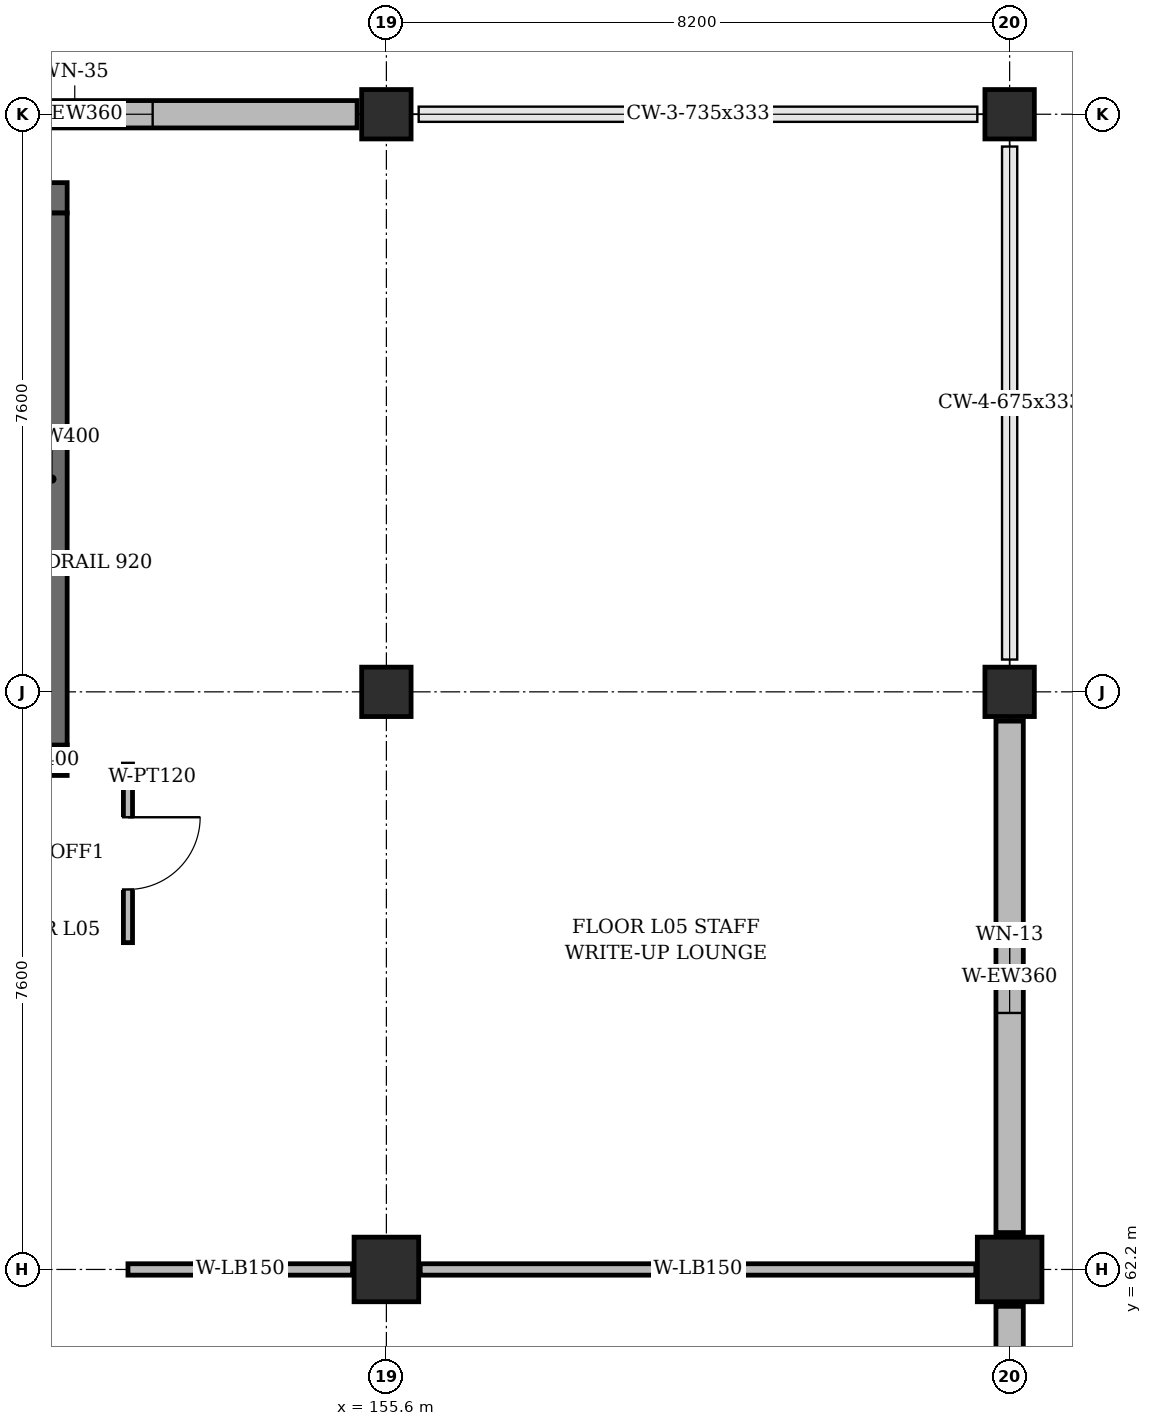
"""IFC4 building model, lengths in metres.
Left out: names, types, materials, properties, quantities, classifications, styles, units other than length and angle.
Written with IfcOpenShell. Run it as: python <this file> out.ifc"""

import sys

from ifc_helpers import new_model, si_unit, direction, frame, frame_2d, origin, origin_2d, place, context, subcontext, project, spatial, rectangle, extrude, element, fill, save


model = new_model("IFC4")
c1 = context("Model", 3, precision=1e-05, world=origin(), true_north=direction((0.0, 1.0)))
c2 = subcontext(c1, "Body", "Model", "MODEL_VIEW")
j1 = project(units=[si_unit("LENGTHUNIT", "METRE"), si_unit("PLANEANGLEUNIT", "RADIAN")], contexts=[c1])
p1 = place(None, origin())
s1 = spatial("IfcSite", under=j1, at=p1, CompositionType="ELEMENT")
p2 = place(p1, origin())
s2 = spatial("IfcBuilding", under=s1, at=p2, CompositionType="ELEMENT")
p3 = place(p2, frame((0.0, 0.0, 24.0)))
s3 = spatial("IfcBuildingStorey", under=s2, at=p3, CompositionType="ELEMENT", Elevation=24.0)
p4 = place(p3, frame((155.6, 62.2, 0.0), z_axis=(0.0, 0.0, 1.0), x_axis=(1.0, 0.0, 0.0)))
e1 = element("IfcColumn", 1, at=p4, inside=s3, PredefinedType="COLUMN", context=c2, shape_type="SweptSolid", body=[
    extrude(rectangle(XDim=0.85, YDim=0.85, at=origin_2d()), origin(), (0.0, 0.0, 1.0), 3.93),
])
for number, where, z_axis, x_axis in (
    (2, (155.6, 69.8, 0.0), (0.0, 0.0, 1.0), (1.0, 0.0, 0.0)),
    (3, (155.6, 77.4, 0.0), (0.0, 0.0, 1.0), (1.0, 0.0, 0.0)),
):
    element("IfcColumn", number, at=place(p3, frame(where, z_axis=z_axis, x_axis=x_axis)), inside=s3, PredefinedType="COLUMN", context=c2, shape_type="SweptSolid", body=[
        extrude(rectangle(XDim=0.65, YDim=0.65, at=origin_2d()), origin(), (0.0, 0.0, 1.0), 3.93),
    ])
p5 = place(p3, frame((163.8, 62.2, 0.0), z_axis=(0.0, 0.0, 1.0), x_axis=(1.0, 0.0, 0.0)))
e4 = element("IfcColumn", 4, at=p5, inside=s3, PredefinedType="COLUMN", context=c2, shape_type="SweptSolid", body=[
    extrude(rectangle(XDim=0.85, YDim=0.85, at=origin_2d()), origin(), (0.0, 0.0, 1.0), 3.93),
])
for number, where, z_axis, x_axis in (
    (5, (163.8, 69.8, 0.0), (0.0, 0.0, 1.0), (1.0, 0.0, 0.0)),
    (6, (163.8, 77.4, 0.0), (0.0, 0.0, 1.0), (1.0, 0.0, 0.0)),
):
    element("IfcColumn", number, at=place(p3, frame(where, z_axis=z_axis, x_axis=x_axis)), inside=s3, PredefinedType="COLUMN", context=c2, shape_type="SweptSolid", body=[
        extrude(rectangle(XDim=0.65, YDim=0.65, at=origin_2d()), origin(), (0.0, 0.0, 1.0), 3.93),
    ])
p6 = place(p3, frame((163.8, 55.085, 0.0), z_axis=(0.0, 0.0, 1.0), x_axis=(0.0, 1.0, 0.0)))
e7 = element("IfcWall", 7, at=p6, inside=s3, PredefinedType="SOLIDWALL", context=c2, shape_type="SweptSolid", body=[
    extrude(rectangle(XDim=6.63, YDim=0.36, at=frame_2d((3.315, 0.0))), origin(), (0.0, 0.0, 1.0), 3.315),
])
p7 = place(p6, frame((2.565, 0.0, 0.95)))
e8 = element("IfcOpeningElement", 8, at=p7, cuts=e7, PredefinedType="OPENING", context=c2, shape_type="SweptSolid", body=[
    extrude(rectangle(XDim=1.5, YDim=2.1, at=frame_2d((0.75, 1.05))), frame((0.0, 0.192, 0.0), z_axis=(0.0, -1.0, 0.0), x_axis=(1.0, 0.0, 0.0)), (0.0, 0.0, 1.0), 0.384),
])
p8 = place(p3, frame((163.8, 62.685, 0.0), z_axis=(0.0, 0.0, 1.0), x_axis=(0.0, 1.0, 0.0)))
e9 = element("IfcWall", 9, at=p8, inside=s3, PredefinedType="SOLIDWALL", context=c2, shape_type="SweptSolid", body=[
    extrude(rectangle(XDim=6.73, YDim=0.36, at=frame_2d((3.365, 0.0))), origin(), (0.0, 0.0, 1.0), 3.315),
])
p9 = place(p8, frame((2.89, 0.0, 0.95)))
e10 = element("IfcOpeningElement", 10, at=p9, cuts=e9, PredefinedType="OPENING", context=c2, shape_type="SweptSolid", body=[
    extrude(rectangle(XDim=0.95, YDim=1.25, at=frame_2d((0.475, 0.625))), frame((0.0, 0.192, 0.0), z_axis=(0.0, -1.0, 0.0), x_axis=(1.0, 0.0, 0.0)), (0.0, 0.0, 1.0), 0.384),
])
p10 = place(p3, frame((155.215, 77.4, 0.0), z_axis=(0.0, 0.0, 1.0), x_axis=(-1.0, 0.0, 0.0)))
e11 = element("IfcWall", 11, at=p10, inside=s3, PredefinedType="SOLIDWALL", context=c2, shape_type="SweptSolid", body=[
    extrude(rectangle(XDim=7.43, YDim=0.36, at=frame_2d((3.715, 0.0))), origin(), (0.0, 0.0, 1.0), 3.315),
])
p11 = place(p10, frame((2.69, 0.0, 0.95)))
e12 = element("IfcOpeningElement", 12, at=p11, cuts=e11, PredefinedType="OPENING", context=c2, shape_type="SweptSolid", body=[
    extrude(rectangle(XDim=2.05, YDim=1.75, at=frame_2d((1.025, 0.875))), frame((0.0, 0.192, 0.0), z_axis=(0.0, -1.0, 0.0), x_axis=(1.0, 0.0, 0.0)), (0.0, 0.0, 1.0), 0.384),
])
p12 = place(p3, frame((147.6, 68.9, 0.0), z_axis=(0.0, 0.0, 1.0), x_axis=(1.0, 0.0, 0.0)))
e13 = element("IfcWall", 13, at=p12, inside=s3, PredefinedType="SHEAR", context=c2, shape_type="SweptSolid", body=[
    extrude(rectangle(XDim=3.8, YDim=0.4, at=frame_2d((1.9, 0.0))), origin(), (0.0, 0.0, 1.0), 3.93),
])
p13 = place(p12, frame((1.3, 0.0, 0.0)))
e14 = element("IfcOpeningElement", 14, at=p13, cuts=e13, PredefinedType="OPENING", context=c2, shape_type="SweptSolid", body=[
    extrude(rectangle(XDim=1.2, YDim=2.2, at=frame_2d((0.6, 1.1))), frame((0.0, 0.212, 0.0), z_axis=(0.0, -1.0, 0.0), x_axis=(1.0, 0.0, 0.0)), (0.0, 0.0, 1.0), 0.424),
])
p14 = place(p3, frame((147.6, 76.3, 0.0), z_axis=(0.0, 0.0, 1.0), x_axis=(1.0, 0.0, 0.0)))
e15 = element("IfcWall", 15, at=p14, inside=s3, PredefinedType="SHEAR", context=c2, shape_type="SweptSolid", body=[
    extrude(rectangle(XDim=3.8, YDim=0.4, at=frame_2d((1.9, 0.0))), origin(), (0.0, 0.0, 1.0), 3.93),
])
p15 = place(p3, frame((151.2, 69.1, 0.0), z_axis=(0.0, 0.0, 1.0), x_axis=(0.0, 1.0, 0.0)))
e16 = element("IfcWall", 16, at=p15, inside=s3, PredefinedType="SHEAR", context=c2, shape_type="SweptSolid", body=[
    extrude(rectangle(XDim=7.0, YDim=0.4, at=frame_2d((3.5, 0.0))), origin(), (0.0, 0.0, 1.0), 3.93),
])
p16 = place(p3, frame((152.2, 68.85, 0.0), z_axis=(0.0, 0.0, 1.0), x_axis=(0.0, -1.0, 0.0)))
e17 = element("IfcWall", 17, at=p16, inside=s3, PredefinedType="PARTITIONING", context=c2, shape_type="SweptSolid", body=[
    extrude(rectangle(XDim=2.35, YDim=0.12, at=frame_2d((1.175, 0.0))), origin(), (0.0, 0.0, 1.0), 3.805),
])
p17 = place(p16, frame((0.7, 0.0, 0.0)))
e18 = element("IfcOpeningElement", 18, at=p17, cuts=e17, PredefinedType="OPENING", context=c2, shape_type="SweptSolid", body=[
    extrude(rectangle(XDim=0.95, YDim=2.2, at=frame_2d((0.475, 1.1))), frame((0.0, 0.072, 0.0), z_axis=(0.0, -1.0, 0.0), x_axis=(1.0, 0.0, 0.0)), (0.0, 0.0, 1.0), 0.144),
])
p18 = place(p3, frame((152.2, 62.2, 0.0), z_axis=(0.0, 0.0, 1.0), x_axis=(1.0, 0.0, 0.0)))
e19 = element("IfcWall", 19, at=p18, inside=s3, PredefinedType="PARTITIONING", context=c2, shape_type="SweptSolid", body=[
    extrude(rectangle(XDim=2.955, YDim=0.15, at=frame_2d((1.478, 0.0))), origin(), (0.0, 0.0, 1.0), 3.265),
])
p19 = place(p3, frame((156.045, 62.2, 0.0), z_axis=(0.0, 0.0, 1.0), x_axis=(1.0, 0.0, 0.0)))
e20 = element("IfcWall", 20, at=p19, inside=s3, PredefinedType="PARTITIONING", context=c2, shape_type="SweptSolid", body=[
    extrude(rectangle(XDim=7.31, YDim=0.15, at=frame_2d((3.655, 0.0))), origin(), (0.0, 0.0, 1.0), 3.265),
])
p20 = place(p9, origin())
e21 = element("IfcWindow", 21, at=p20, inside=s3, PartitioningType="SINGLE_PANEL", PredefinedType="WINDOW", context=c2, shape_type="SweptSolid", body=[
    extrude(rectangle(XDim=0.95, YDim=1.25, at=frame_2d((0.475, 0.625))), frame((0.0, 0.03, 0.0), z_axis=(0.0, -1.0, 0.0), x_axis=(1.0, 0.0, 0.0)), (0.0, 0.0, 1.0), 0.06),
])
fill(e10, e21)
p21 = place(p11, origin())
e22 = element("IfcWindow", 22, at=p21, inside=s3, PartitioningType="DOUBLE_PANEL_VERTICAL", PredefinedType="WINDOW", context=c2, shape_type="SweptSolid", body=[
    extrude(rectangle(XDim=2.05, YDim=1.75, at=frame_2d((1.025, 0.875))), frame((0.0, 0.03, 0.0), z_axis=(0.0, -1.0, 0.0), x_axis=(1.0, 0.0, 0.0)), (0.0, 0.0, 1.0), 0.06),
])
fill(e12, e22)
p22 = place(p17, origin())
e23 = element("IfcDoor", 23, at=p22, inside=s3, OperationType="SINGLE_SWING_LEFT", PredefinedType="DOOR", context=c2, shape_type="SweptSolid", body=[
    extrude(rectangle(XDim=0.95, YDim=2.2, at=frame_2d((0.475, 1.1))), frame((0.0, 0.025, 0.0), z_axis=(0.0, -1.0, 0.0), x_axis=(1.0, 0.0, 0.0)), (0.0, 0.0, 1.0), 0.05),
])
fill(e18, e23)
save(model, sys.argv[1])
